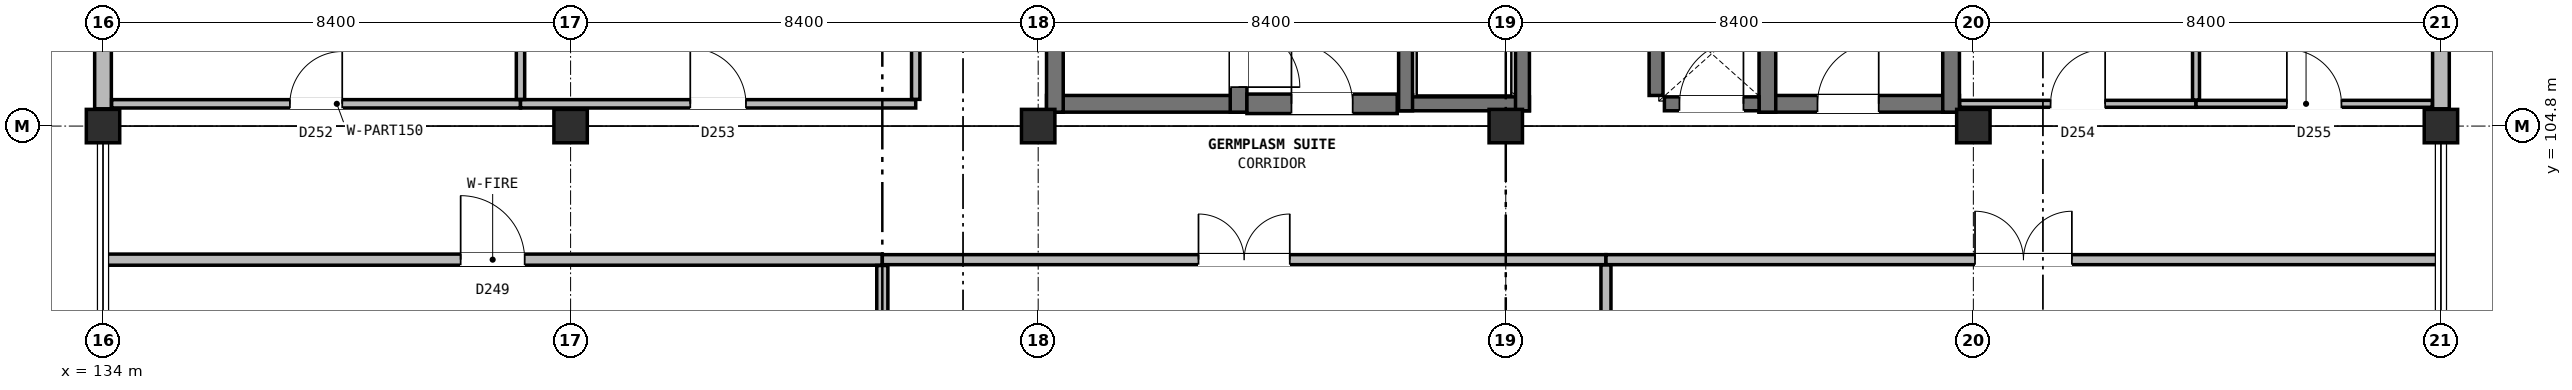
"""IFC4 building model, lengths in metres.
Left out: names, types, materials, properties, quantities, classifications, styles, units other than length and angle.
Written with IfcOpenShell. Run it as: python <this file> out.ifc"""

import sys

from ifc_helpers import new_model, si_unit, direction, frame, frame_2d, origin, origin_2d, place, context, subcontext, project, spatial, rectangle, extrude, element, fill, save


model = new_model("IFC4")
c1 = context("Model", 3, precision=1e-05, world=origin(), true_north=direction((0.0, 1.0)))
c2 = subcontext(c1, "Body", "Model", "MODEL_VIEW")
j1 = project(units=[si_unit("LENGTHUNIT", "METRE"), si_unit("PLANEANGLEUNIT", "RADIAN")], contexts=[c1])
p1 = place(None, origin())
s1 = spatial("IfcSite", under=j1, at=p1, CompositionType="ELEMENT")
p2 = place(p1, origin())
s2 = spatial("IfcBuilding", under=s1, at=p2, CompositionType="ELEMENT")
p3 = place(p2, frame((0.0, 0.0, 44.4)))
s3 = spatial("IfcBuildingStorey", under=s2, at=p3, CompositionType="ELEMENT", Elevation=44.4)
for number, where, z_axis, x_axis in (
    (1, (134.0, 104.8, 0.0), (0.0, 0.0, 1.0), (1.0, 0.0, 0.0)),
    (2, (142.4, 104.8, 0.0), (0.0, 0.0, 1.0), (1.0, 0.0, 0.0)),
    (3, (150.8, 104.8, 0.0), (0.0, 0.0, 1.0), (1.0, 0.0, 0.0)),
    (4, (159.2, 104.8, 0.0), (0.0, 0.0, 1.0), (1.0, 0.0, 0.0)),
    (5, (167.6, 104.8, 0.0), (0.0, 0.0, 1.0), (1.0, 0.0, 0.0)),
    (6, (176.0, 104.8, 0.0), (0.0, 0.0, 1.0), (1.0, 0.0, 0.0)),
):
    element("IfcColumn", number, at=place(p3, frame(where, z_axis=z_axis, x_axis=x_axis)), inside=s3, PredefinedType="COLUMN", context=c2, shape_type="SweptSolid", body=[
        extrude(rectangle(XDim=0.6, YDim=0.6, at=origin_2d()), origin(), (0.0, 0.0, 1.0), 3.8),
    ])
p4 = place(p3, frame((176.0, 105.11, 0.0), z_axis=(0.0, 0.0, 1.0), x_axis=(0.0, 1.0, 0.0)))
e7 = element("IfcWall", 7, at=p4, inside=s3, PredefinedType="SOLIDWALL", context=c2, shape_type="SweptSolid", body=[
    extrude(rectangle(XDim=8.18, YDim=0.3, at=frame_2d((4.09, 0.0))), origin(), (0.0, 0.0, 1.0), 3.05),
])
p5 = place(p4, frame((2.835, 0.0, 0.9)))
e8 = element("IfcOpeningElement", 8, at=p5, cuts=e7, PredefinedType="OPENING", context=c2, shape_type="SweptSolid", body=[
    extrude(rectangle(XDim=2.6, YDim=2.0, at=frame_2d((1.3, 1.0))), frame((0.0, 0.16, 0.0), z_axis=(0.0, -1.0, 0.0), x_axis=(1.0, 0.0, 0.0)), (0.0, 0.0, 1.0), 0.32),
])
p6 = place(p3, frame((134.0, 113.29, 0.0), z_axis=(0.0, 0.0, 1.0), x_axis=(0.0, -1.0, 0.0)))
e9 = element("IfcWall", 9, at=p6, inside=s3, PredefinedType="SOLIDWALL", context=c2, shape_type="SweptSolid", body=[
    extrude(rectangle(XDim=8.18, YDim=0.3, at=frame_2d((4.09, 0.0))), origin(), (0.0, 0.0, 1.0), 3.05),
])
p7 = place(p6, frame((3.305, 0.0, 0.9)))
e10 = element("IfcOpeningElement", 10, at=p7, cuts=e9, PredefinedType="OPENING", context=c2, shape_type="SweptSolid", body=[
    extrude(rectangle(XDim=1.48, YDim=1.84, at=frame_2d((0.74, 0.92))), frame((0.0, 0.16, 0.0), z_axis=(0.0, -1.0, 0.0), x_axis=(1.0, 0.0, 0.0)), (0.0, 0.0, 1.0), 0.32),
])
p8 = place(p3, frame((150.95, 105.2, 0.0), z_axis=(0.0, 0.0, 1.0), x_axis=(1.0, 0.0, 0.0)))
e11 = element("IfcWall", 11, at=p8, inside=s3, PredefinedType="SHEAR", context=c2, shape_type="SweptSolid", body=[
    extrude(rectangle(XDim=3.6, YDim=0.3, at=frame_2d((1.8, 0.0))), origin(), (0.0, 0.0, 1.0), 3.8),
])
p9 = place(p3, frame((151.1, 105.05, 0.0), z_axis=(0.0, 0.0, 1.0), x_axis=(0.0, 1.0, 0.0)))
e12 = element("IfcWall", 12, at=p9, inside=s3, PredefinedType="SHEAR", context=c2, shape_type="SweptSolid", body=[
    extrude(rectangle(XDim=8.3, YDim=0.3, at=frame_2d((4.15, 0.0))), origin(), (0.0, 0.0, 1.0), 3.8),
])
p10 = place(p3, frame((154.4, 105.05, 0.0), z_axis=(0.0, 0.0, 1.0), x_axis=(0.0, 1.0, 0.0)))
e13 = element("IfcWall", 13, at=p10, inside=s3, PredefinedType="SHEAR", context=c2, shape_type="SweptSolid", body=[
    extrude(rectangle(XDim=8.3, YDim=0.3, at=frame_2d((4.15, 0.0))), origin(), (0.0, 0.0, 1.0), 3.8),
])
p11 = place(p10, frame((0.45, 0.0, 0.0)))
e14 = element("IfcOpeningElement", 14, at=p11, cuts=e13, PredefinedType="OPENING", context=c2, shape_type="SweptSolid", body=[
    extrude(rectangle(XDim=1.1, YDim=2.2, at=frame_2d((0.55, 1.1))), frame((0.0, 0.16, 0.0), z_axis=(0.0, -1.0, 0.0), x_axis=(1.0, 0.0, 0.0)), (0.0, 0.0, 1.0), 0.32),
])
p12 = place(p3, frame((163.75, 105.2, 0.0), z_axis=(0.0, 0.0, 1.0), x_axis=(1.0, 0.0, 0.0)))
e15 = element("IfcWall", 15, at=p12, inside=s3, PredefinedType="SHEAR", context=c2, shape_type="SweptSolid", body=[
    extrude(rectangle(XDim=3.6, YDim=0.3, at=frame_2d((1.8, 0.0))), origin(), (0.0, 0.0, 1.0), 3.8),
])
p13 = place(p12, frame((1.05, 0.0, 0.0)))
e16 = element("IfcOpeningElement", 16, at=p13, cuts=e15, PredefinedType="OPENING", context=c2, shape_type="SweptSolid", body=[
    extrude(rectangle(XDim=1.1, YDim=2.2, at=frame_2d((0.55, 1.1))), frame((0.0, 0.16, 0.0), z_axis=(0.0, -1.0, 0.0), x_axis=(1.0, 0.0, 0.0)), (0.0, 0.0, 1.0), 0.32),
])
for number, where, z_axis, x_axis in (
    (17, (163.9, 105.05, 0.0), (0.0, 0.0, 1.0), (0.0, 1.0, 0.0)),
    (18, (167.2, 105.05, 0.0), (0.0, 0.0, 1.0), (0.0, 1.0, 0.0)),
):
    element("IfcWall", number, at=place(p3, frame(where, z_axis=z_axis, x_axis=x_axis)), inside=s3, PredefinedType="SHEAR", context=c2, shape_type="SweptSolid", body=[
        extrude(rectangle(XDim=8.3, YDim=0.3, at=frame_2d((4.15, 0.0))), origin(), (0.0, 0.0, 1.0), 3.8),
    ])
p14 = place(p3, frame((157.275, 105.2, 0.0), z_axis=(0.0, 0.0, 1.0), x_axis=(1.0, 0.0, 0.0)))
e19 = element("IfcWall", 19, at=p14, inside=s3, PredefinedType="SOLIDWALL", context=c2, shape_type="SweptSolid", body=[
    extrude(rectangle(XDim=2.35, YDim=0.25, at=frame_2d((1.175, 0.0))), origin(), (0.0, 0.0, 1.0), 3.48),
])
for number, where, z_axis, x_axis in (
    (20, (157.4, 105.075, 0.0), (0.0, 0.0, 1.0), (0.0, 1.0, 0.0)),
    (21, (159.5, 105.075, 0.0), (0.0, 0.0, 1.0), (0.0, 1.0, 0.0)),
):
    element("IfcWall", number, at=place(p3, frame(where, z_axis=z_axis, x_axis=x_axis)), inside=s3, PredefinedType="SOLIDWALL", context=c2, shape_type="SweptSolid", body=[
        extrude(rectangle(XDim=2.65, YDim=0.25, at=frame_2d((1.325, 0.0))), origin(), (0.0, 0.0, 1.0), 3.48),
    ])
p15 = place(p3, frame((154.55, 105.2, 0.0), z_axis=(0.0, 0.0, 1.0), x_axis=(1.0, 0.0, 0.0)))
e22 = element("IfcWall", 22, at=p15, inside=s3, PredefinedType="SHEAR", context=c2, shape_type="SweptSolid", body=[
    extrude(rectangle(XDim=2.7, YDim=0.35, at=frame_2d((1.35, 0.0))), origin(), (0.0, 0.0, 1.0), 3.48),
])
p16 = place(p15, frame((0.8, 0.0, 0.0)))
e23 = element("IfcOpeningElement", 23, at=p16, cuts=e22, PredefinedType="OPENING", context=c2, shape_type="SweptSolid", body=[
    extrude(rectangle(XDim=1.1, YDim=2.2, at=frame_2d((0.55, 1.1))), frame((0.0, 0.185, 0.0), z_axis=(0.0, -1.0, 0.0), x_axis=(1.0, 0.0, 0.0)), (0.0, 0.0, 1.0), 0.37),
])
p17 = place(p3, frame((161.9, 105.35, 0.0), z_axis=(0.0, 0.0, 1.0), x_axis=(0.0, 1.0, 0.0)))
e24 = element("IfcWall", 24, at=p17, inside=s3, PredefinedType="SOLIDWALL", context=c2, shape_type="SweptSolid", body=[
    extrude(rectangle(XDim=1.5, YDim=0.25, at=frame_2d((0.75, 0.0))), origin(), (0.0, 0.0, 1.0), 3.48),
])
p18 = place(p3, frame((162.05, 105.2, 0.0), z_axis=(0.0, 0.0, 1.0), x_axis=(1.0, 0.0, 0.0)))
e25 = element("IfcWall", 25, at=p18, inside=s3, PredefinedType="SOLIDWALL", context=c2, shape_type="SweptSolid", body=[
    extrude(rectangle(XDim=1.7, YDim=0.25, at=frame_2d((0.85, 0.0))), origin(), (0.0, 0.0, 1.0), 3.48),
])
p19 = place(p18, frame((0.27, 0.0, 0.0)))
e26 = element("IfcOpeningElement", 26, at=p19, cuts=e25, PredefinedType="OPENING", context=c2, shape_type="SweptSolid", body=[
    extrude(rectangle(XDim=1.15, YDim=2.2, at=frame_2d((0.575, 1.1))), frame((0.0, 0.135, 0.0), z_axis=(0.0, -1.0, 0.0), x_axis=(1.0, 0.0, 0.0)), (0.0, 0.0, 1.0), 0.27),
])
p20 = place(p3, frame((134.0, 102.4, 0.0), z_axis=(0.0, 0.0, 1.0), x_axis=(1.0, 0.0, 0.0)))
e27 = element("IfcWall", 27, at=p20, inside=s3, PredefinedType="PARTITIONING", context=c2, shape_type="SweptSolid", body=[
    extrude(rectangle(XDim=14.0, YDim=0.2, at=frame_2d((7.0, 0.0))), origin(), (0.0, 0.0, 1.0), 3.465),
])
p21 = place(p20, frame((6.425, 0.0, 0.0)))
e28 = element("IfcOpeningElement", 28, at=p21, cuts=e27, PredefinedType="OPENING", context=c2, shape_type="SweptSolid", body=[
    extrude(rectangle(XDim=1.15, YDim=2.2, at=frame_2d((0.575, 1.1))), frame((0.0, 0.11, 0.0), z_axis=(0.0, -1.0, 0.0), x_axis=(1.0, 0.0, 0.0)), (0.0, 0.0, 1.0), 0.22),
])
p22 = place(p3, frame((148.0, 102.4, 0.0), z_axis=(0.0, 0.0, 1.0), x_axis=(1.0, 0.0, 0.0)))
e29 = element("IfcWall", 29, at=p22, inside=s3, PredefinedType="PARTITIONING", context=c2, shape_type="SweptSolid", body=[
    extrude(rectangle(XDim=13.0, YDim=0.18, at=frame_2d((6.5, 0.0))), origin(), (0.0, 0.0, 1.0), 3.465),
])
p23 = place(p22, frame((5.68, 0.0, 0.0)))
e30 = element("IfcOpeningElement", 30, at=p23, cuts=e29, PredefinedType="OPENING", context=c2, shape_type="SweptSolid", body=[
    extrude(rectangle(XDim=1.64, YDim=2.32, at=frame_2d((0.82, 1.16))), frame((0.0, 0.1, 0.0), z_axis=(0.0, -1.0, 0.0), x_axis=(1.0, 0.0, 0.0)), (0.0, 0.0, 1.0), 0.2),
])
p24 = place(p3, frame((161.0, 102.4, 0.0), z_axis=(0.0, 0.0, 1.0), x_axis=(1.0, 0.0, 0.0)))
e31 = element("IfcWall", 31, at=p24, inside=s3, PredefinedType="PARTITIONING", context=c2, shape_type="SweptSolid", body=[
    extrude(rectangle(XDim=15.0, YDim=0.18, at=frame_2d((7.5, 0.0))), origin(), (0.0, 0.0, 1.0), 3.465),
])
p25 = place(p24, frame((6.63, 0.0, 0.0)))
e32 = element("IfcOpeningElement", 32, at=p25, cuts=e31, PredefinedType="OPENING", context=c2, shape_type="SweptSolid", body=[
    extrude(rectangle(XDim=1.74, YDim=2.34, at=frame_2d((0.87, 1.17))), frame((0.0, 0.1, 0.0), z_axis=(0.0, -1.0, 0.0), x_axis=(1.0, 0.0, 0.0)), (0.0, 0.0, 1.0), 0.2),
])
p26 = place(p3, frame((134.155, 105.2, 0.0), z_axis=(0.0, 0.0, 1.0), x_axis=(1.0, 0.0, 0.0)))
e33 = element("IfcWall", 33, at=p26, inside=s3, PredefinedType="PARTITIONING", context=c2, shape_type="SweptSolid", body=[
    extrude(rectangle(XDim=7.345, YDim=0.15, at=frame_2d((3.672, 0.0))), origin(), (0.0, 0.0, 1.0), 3.045),
])
p27 = place(p26, frame((3.202, 0.0, 0.0)))
e34 = element("IfcOpeningElement", 34, at=p27, cuts=e33, PredefinedType="OPENING", context=c2, shape_type="SweptSolid", body=[
    extrude(rectangle(XDim=0.94, YDim=2.12, at=frame_2d((0.47, 1.06))), frame((0.0, 0.085, 0.0), z_axis=(0.0, -1.0, 0.0), x_axis=(1.0, 0.0, 0.0)), (0.0, 0.0, 1.0), 0.17),
])
p28 = place(p3, frame((141.5, 105.2, 0.0), z_axis=(0.0, 0.0, 1.0), x_axis=(1.0, 0.0, 0.0)))
e35 = element("IfcWall", 35, at=p28, inside=s3, PredefinedType="PARTITIONING", context=c2, shape_type="SweptSolid", body=[
    extrude(rectangle(XDim=7.1, YDim=0.15, at=frame_2d((3.55, 0.0))), origin(), (0.0, 0.0, 1.0), 3.045),
])
p29 = place(p28, frame((3.05, 0.0, 0.0)))
e36 = element("IfcOpeningElement", 36, at=p29, cuts=e35, PredefinedType="OPENING", context=c2, shape_type="SweptSolid", body=[
    extrude(rectangle(XDim=1.0, YDim=2.16, at=frame_2d((0.5, 1.08))), frame((0.0, 0.085, 0.0), z_axis=(0.0, -1.0, 0.0), x_axis=(1.0, 0.0, 0.0)), (0.0, 0.0, 1.0), 0.17),
])
p30 = place(p3, frame((167.355, 105.2, 0.0), z_axis=(0.0, 0.0, 1.0), x_axis=(1.0, 0.0, 0.0)))
e37 = element("IfcWall", 37, at=p30, inside=s3, PredefinedType="PARTITIONING", context=c2, shape_type="SweptSolid", body=[
    extrude(rectangle(XDim=4.245, YDim=0.125, at=frame_2d((2.123, 0.0))), origin(), (0.0, 0.0, 1.0), 3.045),
])
p31 = place(p30, frame((1.633, 0.0, 0.0)))
e38 = element("IfcOpeningElement", 38, at=p31, cuts=e37, PredefinedType="OPENING", context=c2, shape_type="SweptSolid", body=[
    extrude(rectangle(XDim=0.98, YDim=2.1, at=frame_2d((0.49, 1.05))), frame((0.0, 0.073, 0.0), z_axis=(0.0, -1.0, 0.0), x_axis=(1.0, 0.0, 0.0)), (0.0, 0.0, 1.0), 0.145),
])
p32 = place(p3, frame((171.6, 105.2, 0.0), z_axis=(0.0, 0.0, 1.0), x_axis=(1.0, 0.0, 0.0)))
e39 = element("IfcWall", 39, at=p32, inside=s3, PredefinedType="PARTITIONING", context=c2, shape_type="SweptSolid", body=[
    extrude(rectangle(XDim=4.245, YDim=0.125, at=frame_2d((2.123, 0.0))), origin(), (0.0, 0.0, 1.0), 3.045),
])
p33 = place(p32, frame((1.633, 0.0, 0.0)))
e40 = element("IfcOpeningElement", 40, at=p33, cuts=e39, PredefinedType="OPENING", context=c2, shape_type="SweptSolid", body=[
    extrude(rectangle(XDim=0.98, YDim=2.1, at=frame_2d((0.49, 1.05))), frame((0.0, 0.073, 0.0), z_axis=(0.0, -1.0, 0.0), x_axis=(1.0, 0.0, 0.0)), (0.0, 0.0, 1.0), 0.145),
])
p34 = place(p3, frame((148.6, 105.28, 0.0), z_axis=(0.0, 0.0, 1.0), x_axis=(0.0, 1.0, 0.0)))
e41 = element("IfcWall", 41, at=p34, inside=s3, PredefinedType="PARTITIONING", context=c2, shape_type="SweptSolid", body=[
    extrude(rectangle(XDim=14.12, YDim=0.15, at=frame_2d((7.06, 0.0))), origin(), (0.0, 0.0, 1.0), 3.465),
])
p35 = place(p3, frame((148.0, 87.355, 0.0), z_axis=(0.0, 0.0, 1.0), x_axis=(0.0, 1.0, 0.0)))
e42 = element("IfcWall", 42, at=p35, inside=s3, PredefinedType="PARTITIONING", context=c2, shape_type="SweptSolid", body=[
    extrude(rectangle(XDim=14.94, YDim=0.2, at=frame_2d((7.47, 0.0))), origin(), (0.0, 0.0, 1.0), 3.465),
])
p36 = place(p3, frame((161.0, 87.355, 0.0), z_axis=(0.0, 0.0, 1.0), x_axis=(0.0, 1.0, 0.0)))
e43 = element("IfcWall", 43, at=p36, inside=s3, PredefinedType="PARTITIONING", context=c2, shape_type="SweptSolid", body=[
    extrude(rectangle(XDim=14.95, YDim=0.18, at=frame_2d((7.475, 0.0))), origin(), (0.0, 0.0, 1.0), 3.465),
])
p37 = place(p3, frame((141.5, 105.28, 0.0), z_axis=(0.0, 0.0, 1.0), x_axis=(0.0, 1.0, 0.0)))
e44 = element("IfcWall", 44, at=p37, inside=s3, PredefinedType="PARTITIONING", context=c2, shape_type="SweptSolid", body=[
    extrude(rectangle(XDim=16.965, YDim=0.15, at=frame_2d((8.482, 0.0))), origin(), (0.0, 0.0, 1.0), 3.465),
])
p38 = place(p3, frame((171.6, 105.268, 0.0), z_axis=(0.0, 0.0, 1.0), x_axis=(0.0, 1.0, 0.0)))
e45 = element("IfcWall", 45, at=p38, inside=s3, PredefinedType="PARTITIONING", context=c2, shape_type="SweptSolid", body=[
    extrude(rectangle(XDim=16.978, YDim=0.125, at=frame_2d((8.489, 0.0))), origin(), (0.0, 0.0, 1.0), 3.465),
])
p39 = place(p11, frame((1.1, 0.0, 0.0), z_axis=(0.0, 0.0, 1.0), x_axis=(-1.0, 0.0, 0.0)))
e46 = element("IfcDoor", 46, at=p39, inside=s3, OperationType="SINGLE_SWING_LEFT", PredefinedType="DOOR", context=c2, shape_type="SweptSolid", body=[
    extrude(rectangle(XDim=1.1, YDim=2.2, at=frame_2d((0.55, 1.1))), frame((0.0, 0.025, 0.0), z_axis=(0.0, -1.0, 0.0), x_axis=(1.0, 0.0, 0.0)), (0.0, 0.0, 1.0), 0.05),
])
fill(e14, e46)
p40 = place(p13, origin())
e47 = element("IfcDoor", 47, at=p40, inside=s3, OperationType="SINGLE_SWING_RIGHT", PredefinedType="DOOR", context=c2, shape_type="SweptSolid", body=[
    extrude(rectangle(XDim=1.1, YDim=2.2, at=frame_2d((0.55, 1.1))), frame((0.0, 0.025, 0.0), z_axis=(0.0, -1.0, 0.0), x_axis=(1.0, 0.0, 0.0)), (0.0, 0.0, 1.0), 0.05),
])
fill(e16, e47)
p41 = place(p16, origin())
e48 = element("IfcDoor", 48, at=p41, inside=s3, OperationType="SINGLE_SWING_LEFT", PredefinedType="DOOR", context=c2, shape_type="SweptSolid", body=[
    extrude(rectangle(XDim=1.1, YDim=2.2, at=frame_2d((0.55, 1.1))), frame((0.0, 0.025, 0.0), z_axis=(0.0, -1.0, 0.0), x_axis=(1.0, 0.0, 0.0)), (0.0, 0.0, 1.0), 0.05),
])
fill(e23, e48)
p42 = place(p19, origin())
e49 = element("IfcDoor", 49, at=p42, inside=s3, OperationType="SINGLE_SWING_RIGHT", PredefinedType="DOOR", context=c2, shape_type="SweptSolid", body=[
    extrude(rectangle(XDim=1.15, YDim=2.2, at=frame_2d((0.575, 1.1))), frame((0.0, 0.025, 0.0), z_axis=(0.0, -1.0, 0.0), x_axis=(1.0, 0.0, 0.0)), (0.0, 0.0, 1.0), 0.05),
])
fill(e26, e49)
p43 = place(p21, origin())
e50 = element("IfcDoor", 50, at=p43, inside=s3, OperationType="SINGLE_SWING_LEFT", PredefinedType="DOOR", context=c2, shape_type="SweptSolid", body=[
    extrude(rectangle(XDim=1.15, YDim=2.2, at=frame_2d((0.575, 1.1))), frame((0.0, 0.025, 0.0), z_axis=(0.0, -1.0, 0.0), x_axis=(1.0, 0.0, 0.0)), (0.0, 0.0, 1.0), 0.05),
])
fill(e28, e50)
p44 = place(p23, origin())
e51 = element("IfcDoor", 51, at=p44, inside=s3, OperationType="DOUBLE_DOOR_SINGLE_SWING", PredefinedType="DOOR", context=c2, shape_type="SweptSolid", body=[
    extrude(rectangle(XDim=1.64, YDim=2.32, at=frame_2d((0.82, 1.16))), frame((0.0, 0.025, 0.0), z_axis=(0.0, -1.0, 0.0), x_axis=(1.0, 0.0, 0.0)), (0.0, 0.0, 1.0), 0.05),
])
fill(e30, e51)
p45 = place(p25, origin())
e52 = element("IfcDoor", 52, at=p45, inside=s3, OperationType="DOUBLE_DOOR_SINGLE_SWING", PredefinedType="DOOR", context=c2, shape_type="SweptSolid", body=[
    extrude(rectangle(XDim=1.74, YDim=2.34, at=frame_2d((0.87, 1.17))), frame((0.0, 0.025, 0.0), z_axis=(0.0, -1.0, 0.0), x_axis=(1.0, 0.0, 0.0)), (0.0, 0.0, 1.0), 0.05),
])
fill(e32, e52)
p46 = place(p27, origin())
e53 = element("IfcDoor", 53, at=p46, inside=s3, OperationType="SINGLE_SWING_RIGHT", PredefinedType="DOOR", context=c2, shape_type="SweptSolid", body=[
    extrude(rectangle(XDim=0.94, YDim=2.12, at=frame_2d((0.47, 1.06))), frame((0.0, 0.025, 0.0), z_axis=(0.0, -1.0, 0.0), x_axis=(1.0, 0.0, 0.0)), (0.0, 0.0, 1.0), 0.05),
])
fill(e34, e53)
p47 = place(p29, origin())
e54 = element("IfcDoor", 54, at=p47, inside=s3, OperationType="SINGLE_SWING_LEFT", PredefinedType="DOOR", context=c2, shape_type="SweptSolid", body=[
    extrude(rectangle(XDim=1.0, YDim=2.16, at=frame_2d((0.5, 1.08))), frame((0.0, 0.025, 0.0), z_axis=(0.0, -1.0, 0.0), x_axis=(1.0, 0.0, 0.0)), (0.0, 0.0, 1.0), 0.05),
])
fill(e36, e54)
p48 = place(p31, origin())
e55 = element("IfcDoor", 55, at=p48, inside=s3, OperationType="SINGLE_SWING_RIGHT", PredefinedType="DOOR", context=c2, shape_type="SweptSolid", body=[
    extrude(rectangle(XDim=0.98, YDim=2.1, at=frame_2d((0.49, 1.05))), frame((0.0, 0.025, 0.0), z_axis=(0.0, -1.0, 0.0), x_axis=(1.0, 0.0, 0.0)), (0.0, 0.0, 1.0), 0.05),
])
fill(e38, e55)
p49 = place(p33, origin())
e56 = element("IfcDoor", 56, at=p49, inside=s3, OperationType="SINGLE_SWING_LEFT", PredefinedType="DOOR", context=c2, shape_type="SweptSolid", body=[
    extrude(rectangle(XDim=0.98, YDim=2.1, at=frame_2d((0.49, 1.05))), frame((0.0, 0.025, 0.0), z_axis=(0.0, -1.0, 0.0), x_axis=(1.0, 0.0, 0.0)), (0.0, 0.0, 1.0), 0.05),
])
fill(e40, e56)
save(model, sys.argv[1])
